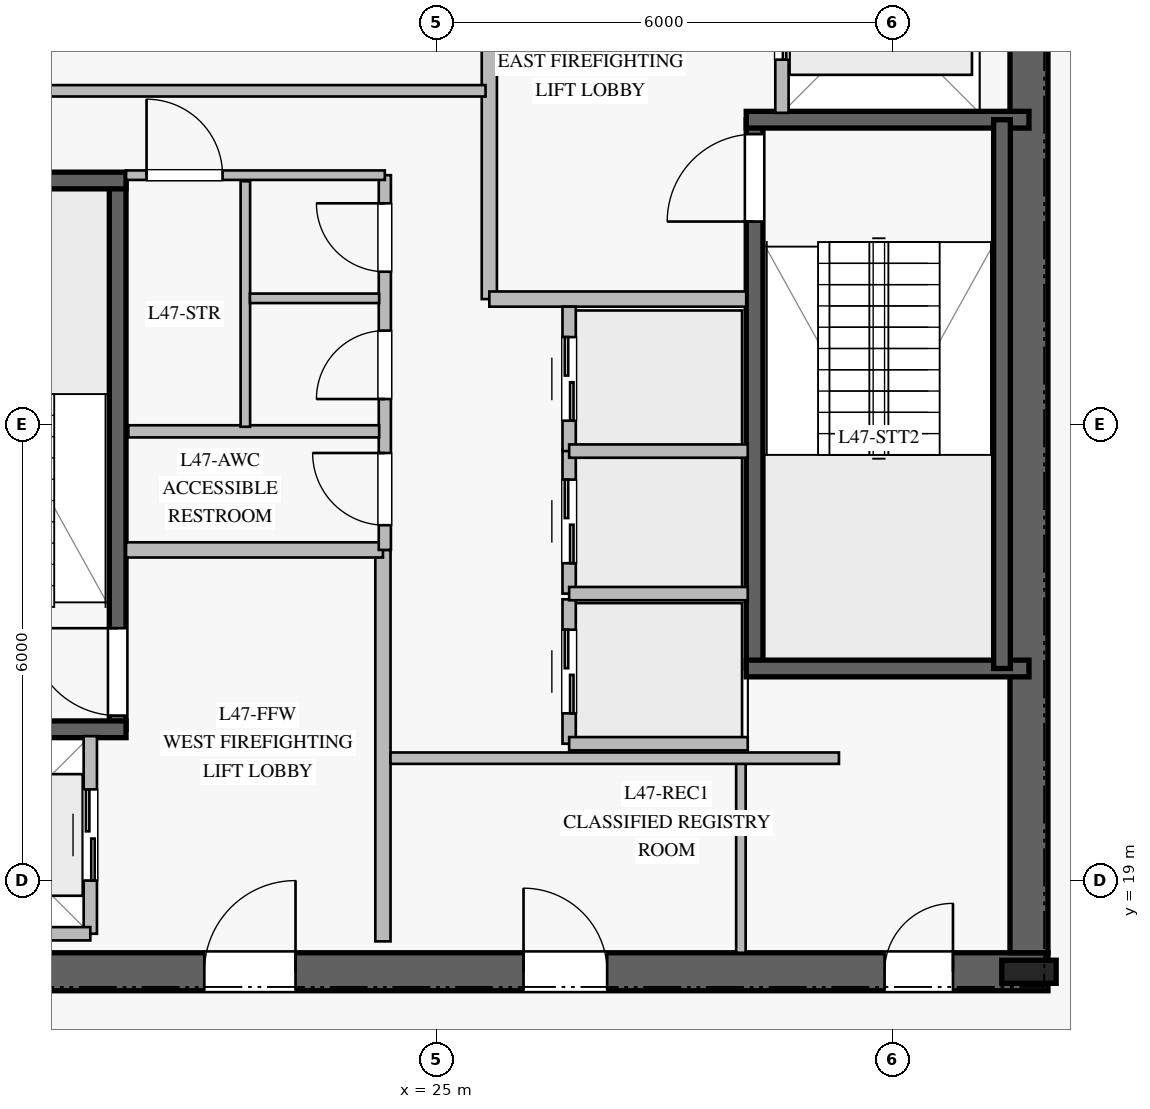
"""IFC4 building model, lengths in metres.
Left out: names, types, materials, properties, quantities, classifications, styles, units other than length and angle.
Written with IfcOpenShell. Run it as: python <this file> out.ifc"""

import sys

from ifc_helpers import new_model, si_unit, direction, frame, frame_2d, origin, origin_2d, place, context, subcontext, project, spatial, rectangle, i_section, extrude, element, fill, save


model = new_model("IFC4")
c1 = context("Model", 3, precision=1e-05, world=origin(), true_north=direction((0.0, 1.0)))
c2 = subcontext(c1, "Body", "Model", "MODEL_VIEW")
j1 = project(units=[si_unit("LENGTHUNIT", "METRE"), si_unit("PLANEANGLEUNIT", "RADIAN")], contexts=[c1])
p1 = place(None, origin())
s1 = spatial("IfcSite", under=j1, at=p1, CompositionType="ELEMENT")
p2 = place(p1, origin())
s2 = spatial("IfcBuilding", under=s1, at=p2, CompositionType="ELEMENT")
p3 = place(p2, frame((0.0, 0.0, 196.8)))
s3 = spatial("IfcBuildingStorey", under=s2, at=p3, CompositionType="ELEMENT", Elevation=196.8)
p4 = place(p3, frame((16.95, 17.8, 0.0), z_axis=(0.0, 0.0, 1.0), x_axis=(1.0, 0.0, 0.0)))
e1 = element("IfcWall", 1, at=p4, inside=s3, PredefinedType="SHEAR", context=c2, shape_type="SweptSolid", body=[
    extrude(rectangle(XDim=16.1, YDim=0.5, at=frame_2d((8.05, 0.0))), origin(), (0.0, 0.0, 1.0), 3.78),
])
p5 = place(p4, frame((5.0, 0.0, 0.0)))
e2 = element("IfcOpeningElement", 2, at=p5, cuts=e1, PredefinedType="OPENING", context=c2, shape_type="SweptSolid", body=[
    extrude(rectangle(XDim=1.2, YDim=2.25, at=frame_2d((0.6, 1.125))), frame((0.0, 0.26, 0.0), z_axis=(0.0, -1.0, 0.0), x_axis=(1.0, 0.0, 0.0)), (0.0, 0.0, 1.0), 0.52),
])
p6 = place(p4, frame((13.95, 0.0, 0.0)))
e3 = element("IfcOpeningElement", 3, at=p6, cuts=e1, PredefinedType="OPENING", context=c2, shape_type="SweptSolid", body=[
    extrude(rectangle(XDim=0.9, YDim=2.1, at=frame_2d((0.45, 1.05))), frame((0.0, 0.26, 0.0), z_axis=(0.0, -1.0, 0.0), x_axis=(1.0, 0.0, 0.0)), (0.0, 0.0, 1.0), 0.52),
])
p7 = place(p4, frame((9.2, 0.0, 0.0)))
e4 = element("IfcOpeningElement", 4, at=p7, cuts=e1, PredefinedType="OPENING", context=c2, shape_type="SweptSolid", body=[
    extrude(rectangle(XDim=1.1, YDim=2.2, at=frame_2d((0.55, 1.1))), frame((0.0, 0.26, 0.0), z_axis=(0.0, -1.0, 0.0), x_axis=(1.0, 0.0, 0.0)), (0.0, 0.0, 1.0), 0.52),
])
p8 = place(p3, frame((32.8, 18.05, 0.0), z_axis=(0.0, 0.0, 1.0), x_axis=(0.0, 1.0, 0.0)))
e5 = element("IfcWall", 5, at=p8, inside=s3, PredefinedType="SHEAR", context=c2, shape_type="SweptSolid", body=[
    extrude(rectangle(XDim=13.9, YDim=0.5, at=frame_2d((6.95, 0.0))), origin(), (0.0, 0.0, 1.0), 3.78),
])
p9 = place(p3, frame((32.8, 17.8, 0.0), z_axis=(0.0, 0.0, 1.0), x_axis=(1.0, 0.0, 0.0)))
e6 = element("IfcColumn", 6, at=p9, inside=s3, PredefinedType="COLUMN", context=c2, shape_type="SweptSolid", body=[
    extrude(i_section(OverallWidth=0.304, OverallDepth=0.716, WebThickness=0.021, FlangeThickness=0.04, at=origin_2d()), origin(), (0.0, 0.0, 1.0), 4.0),
])
p10 = place(p3, frame((20.81, 20.99, 0.0), z_axis=(0.0, 0.0, 1.0), x_axis=(0.0, 1.0, 0.0)))
e7 = element("IfcWall", 7, at=p10, inside=s3, PredefinedType="SOLIDWALL", context=c2, shape_type="SweptSolid", body=[
    extrude(rectangle(XDim=7.22, YDim=0.22, at=frame_2d((3.61, 0.0))), origin(), (0.0, 0.0, 1.0), 3.78),
])
p11 = place(p10, frame((0.18, 0.0, 0.0)))
e8 = element("IfcOpeningElement", 8, at=p11, cuts=e7, PredefinedType="OPENING", context=c2, shape_type="SweptSolid", body=[
    extrude(rectangle(XDim=1.15, YDim=2.2, at=frame_2d((0.575, 1.1))), frame((0.0, 0.12, 0.0), z_axis=(0.0, -1.0, 0.0), x_axis=(1.0, 0.0, 0.0)), (0.0, 0.0, 1.0), 0.24),
])
for number, where, z_axis, x_axis in (
    (9, (17.2, 20.99, 0.0), (0.0, 0.0, 1.0), (1.0, 0.0, 0.0)),
    (10, (17.2, 28.21, 0.0), (0.0, 0.0, 1.0), (1.0, 0.0, 0.0)),
):
    element("IfcWall", number, at=place(p3, frame(where, z_axis=z_axis, x_axis=x_axis)), inside=s3, PredefinedType="SOLIDWALL", context=c2, shape_type="SweptSolid", body=[
        extrude(rectangle(XDim=3.72, YDim=0.22, at=frame_2d((1.86, 0.0))), origin(), (0.0, 0.0, 1.0), 3.78),
    ])
p12 = place(p3, frame((29.19, 21.79, 0.0), z_axis=(0.0, 0.0, 1.0), x_axis=(0.0, 1.0, 0.0)))
e11 = element("IfcWall", 11, at=p12, inside=s3, PredefinedType="SOLIDWALL", context=c2, shape_type="SweptSolid", body=[
    extrude(rectangle(XDim=7.22, YDim=0.22, at=frame_2d((3.61, 0.0))), origin(), (0.0, 0.0, 1.0), 3.78),
])
p13 = place(p12, frame((5.88, 0.0, 0.0)))
e12 = element("IfcOpeningElement", 12, at=p13, cuts=e11, PredefinedType="OPENING", context=c2, shape_type="SweptSolid", body=[
    extrude(rectangle(XDim=1.15, YDim=2.2, at=frame_2d((0.575, 1.1))), frame((0.0, 0.12, 0.0), z_axis=(0.0, -1.0, 0.0), x_axis=(1.0, 0.0, 0.0)), (0.0, 0.0, 1.0), 0.24),
])
for number, where, z_axis, x_axis in (
    (13, (29.08, 21.79, 0.0), (0.0, 0.0, 1.0), (1.0, 0.0, 0.0)),
    (14, (29.08, 29.01, 0.0), (0.0, 0.0, 1.0), (1.0, 0.0, 0.0)),
):
    element("IfcWall", number, at=place(p3, frame(where, z_axis=z_axis, x_axis=x_axis)), inside=s3, PredefinedType="SOLIDWALL", context=c2, shape_type="SweptSolid", body=[
        extrude(rectangle(XDim=3.72, YDim=0.22, at=frame_2d((1.86, 0.0))), origin(), (0.0, 0.0, 1.0), 3.78),
    ])
p14 = place(p3, frame((32.445, 29.01, 0.0), z_axis=(0.0, 0.0, 1.0), x_axis=(0.0, -1.0, 0.0)))
e15 = element("IfcWall", 15, at=p14, inside=s3, PredefinedType="SOLIDWALL", context=c2, shape_type="SweptSolid", body=[
    extrude(rectangle(XDim=7.22, YDim=0.22, at=frame_2d((3.61, 0.0))), origin(), (0.0, 0.0, 1.0), 3.78),
])
p15 = place(p3, frame((24.3, 18.2, 0.0), z_axis=(0.0, 0.0, 1.0), x_axis=(0.0, 1.0, 0.0)))
e16 = element("IfcWall", 16, at=p15, inside=s3, PredefinedType="PARTITIONING", context=c2, shape_type="SweptSolid", body=[
    extrude(rectangle(XDim=5.15, YDim=0.2, at=frame_2d((2.575, 0.0))), origin(), (0.0, 0.0, 1.0), 3.78),
])
p16 = place(p3, frame((20.92, 23.35, 0.0), z_axis=(0.0, 0.0, 1.0), x_axis=(1.0, 0.0, 0.0)))
e17 = element("IfcWall", 17, at=p16, inside=s3, PredefinedType="PARTITIONING", context=c2, shape_type="SweptSolid", body=[
    extrude(rectangle(XDim=3.38, YDim=0.2, at=frame_2d((1.69, 0.0))), origin(), (0.0, 0.0, 1.0), 3.78),
])
p17 = place(p3, frame((25.7, 26.65, 0.0), z_axis=(0.0, 0.0, 1.0), x_axis=(0.0, 1.0, 0.0)))
e18 = element("IfcWall", 18, at=p17, inside=s3, PredefinedType="PARTITIONING", context=c2, shape_type="SweptSolid", body=[
    extrude(rectangle(XDim=5.15, YDim=0.2, at=frame_2d((2.575, 0.0))), origin(), (0.0, 0.0, 1.0), 3.78),
])
p18 = place(p3, frame((25.7, 26.65, 0.0), z_axis=(0.0, 0.0, 1.0), x_axis=(1.0, 0.0, 0.0)))
e19 = element("IfcWall", 19, at=p18, inside=s3, PredefinedType="PARTITIONING", context=c2, shape_type="SweptSolid", body=[
    extrude(rectangle(XDim=3.38, YDim=0.2, at=frame_2d((1.69, 0.0))), origin(), (0.0, 0.0, 1.0), 3.78),
])
p19 = place(p3, frame((24.325, 23.35, 0.0), z_axis=(0.0, 0.0, 1.0), x_axis=(0.0, 1.0, 0.0)))
e20 = element("IfcWall", 20, at=p19, inside=s3, PredefinedType="PLUMBINGWALL", context=c2, shape_type="SweptSolid", body=[
    extrude(rectangle(XDim=4.93, YDim=0.16, at=frame_2d((2.465, 0.0))), origin(), (0.0, 0.0, 1.0), 3.78),
])
p20 = place(p19, frame((0.325, 0.0, 0.0)))
e21 = element("IfcOpeningElement", 21, at=p20, cuts=e20, PredefinedType="OPENING", context=c2, shape_type="SweptSolid", body=[
    extrude(rectangle(XDim=0.95, YDim=2.1, at=frame_2d((0.475, 1.05))), frame((0.0, 0.09, 0.0), z_axis=(0.0, -1.0, 0.0), x_axis=(1.0, 0.0, 0.0)), (0.0, 0.0, 1.0), 0.18),
])
p21 = place(p19, frame((1.985, 0.0, 0.0)))
e22 = element("IfcOpeningElement", 22, at=p21, cuts=e20, PredefinedType="OPENING", context=c2, shape_type="SweptSolid", body=[
    extrude(rectangle(XDim=0.9, YDim=2.1, at=frame_2d((0.45, 1.05))), frame((0.0, 0.09, 0.0), z_axis=(0.0, -1.0, 0.0), x_axis=(1.0, 0.0, 0.0)), (0.0, 0.0, 1.0), 0.18),
])
p22 = place(p19, frame((3.66, 0.0, 0.0)))
e23 = element("IfcOpeningElement", 23, at=p22, cuts=e20, PredefinedType="OPENING", context=c2, shape_type="SweptSolid", body=[
    extrude(rectangle(XDim=0.9, YDim=2.1, at=frame_2d((0.45, 1.05))), frame((0.0, 0.09, 0.0), z_axis=(0.0, -1.0, 0.0), x_axis=(1.0, 0.0, 0.0)), (0.0, 0.0, 1.0), 0.18),
])
p23 = place(p3, frame((20.92, 28.28, 0.0), z_axis=(0.0, 0.0, 1.0), x_axis=(1.0, 0.0, 0.0)))
e24 = element("IfcWall", 24, at=p23, inside=s3, PredefinedType="PARTITIONING", context=c2, shape_type="SweptSolid", body=[
    extrude(rectangle(XDim=3.405, YDim=0.125, at=frame_2d((1.703, 0.0))), origin(), (0.0, 0.0, 1.0), 3.78),
])
p24 = place(p23, frame((0.27, 0.0, 0.0)))
e25 = element("IfcOpeningElement", 25, at=p24, cuts=e24, PredefinedType="OPENING", context=c2, shape_type="SweptSolid", body=[
    extrude(rectangle(XDim=1.0, YDim=2.15, at=frame_2d((0.5, 1.075))), frame((0.0, 0.073, 0.0), z_axis=(0.0, -1.0, 0.0), x_axis=(1.0, 0.0, 0.0)), (0.0, 0.0, 1.0), 0.145),
])
p25 = place(p3, frame((29.01, 18.05, 0.0), z_axis=(0.0, 0.0, 1.0), x_axis=(0.0, 1.0, 0.0)))
e26 = element("IfcWall", 26, at=p25, inside=s3, PredefinedType="PARTITIONING", context=c2, shape_type="SweptSolid", body=[
    extrude(rectangle(XDim=2.5, YDim=0.125, at=frame_2d((1.25, 0.0))), origin(), (0.0, 0.0, 1.0), 3.78),
])
p26 = place(p3, frame((20.95, 24.91, 0.0), z_axis=(0.0, 0.0, 1.0), x_axis=(1.0, 0.0, 0.0)))
e27 = element("IfcWall", 27, at=p26, inside=s3, PredefinedType="PLUMBINGWALL", context=c2, shape_type="SweptSolid", body=[
    extrude(rectangle(XDim=3.3, YDim=0.16, at=frame_2d((1.65, 0.0))), origin(), (0.0, 0.0, 1.0), 3.78),
])
p27 = place(p3, frame((22.49, 24.97, 0.0), z_axis=(0.0, 0.0, 1.0), x_axis=(0.0, 1.0, 0.0)))
e28 = element("IfcWall", 28, at=p27, inside=s3, PredefinedType="PARTITIONING", context=c2, shape_type="SweptSolid", body=[
    extrude(rectangle(XDim=3.23, YDim=0.125, at=frame_2d((1.615, 0.0))), origin(), (0.0, 0.0, 1.0), 3.78),
])
p28 = place(p3, frame((22.55, 26.66, 0.0), z_axis=(0.0, 0.0, 1.0), x_axis=(1.0, 0.0, 0.0)))
e29 = element("IfcWall", 29, at=p28, inside=s3, PredefinedType="PARTITIONING", context=c2, shape_type="SweptSolid", body=[
    extrude(rectangle(XDim=1.7, YDim=0.125, at=frame_2d((0.85, 0.0))), origin(), (0.0, 0.0, 1.0), 3.78),
])
p29 = place(p3, frame((24.4, 20.61, 0.0), z_axis=(0.0, 0.0, 1.0), x_axis=(1.0, 0.0, 0.0)))
e30 = element("IfcWall", 30, at=p29, inside=s3, PredefinedType="PARTITIONING", context=c2, shape_type="SweptSolid", body=[
    extrude(rectangle(XDim=5.9, YDim=0.15, at=frame_2d((2.95, 0.0))), origin(), (0.0, 0.0, 1.0), 3.78),
])
p30 = place(p3, frame((19.75, 29.39, 0.0), z_axis=(0.0, 0.0, 1.0), x_axis=(1.0, 0.0, 0.0)))
e31 = element("IfcWall", 31, at=p30, inside=s3, PredefinedType="PARTITIONING", context=c2, shape_type="SweptSolid", body=[
    extrude(rectangle(XDim=5.9, YDim=0.15, at=frame_2d((2.95, 0.0))), origin(), (0.0, 0.0, 1.0), 3.78),
])
p31 = place(p3, frame((26.75, 20.8, 0.0), z_axis=(0.0, 0.0, 1.0), x_axis=(0.0, 1.0, 0.0)))
e32 = element("IfcWall", 32, at=p31, inside=s3, PredefinedType="PARTITIONING", context=c2, shape_type="SweptSolid", body=[
    extrude(rectangle(XDim=1.9, YDim=0.175, at=frame_2d((0.95, 0.0))), origin(), (0.0, 0.0, 1.0), 3.78),
])
p32 = place(p31, frame((0.4, 0.0, 0.0)))
e33 = element("IfcOpeningElement", 33, at=p32, cuts=e32, PredefinedType="OPENING", context=c2, shape_type="SweptSolid", body=[
    extrude(rectangle(XDim=1.1, YDim=2.2, at=frame_2d((0.55, 1.1))), frame((0.0, 0.098, 0.0), z_axis=(0.0, -1.0, 0.0), x_axis=(1.0, 0.0, 0.0)), (0.0, 0.0, 1.0), 0.195),
])
p33 = place(p3, frame((26.75, 20.8, 0.0), z_axis=(0.0, 0.0, 1.0), x_axis=(1.0, 0.0, 0.0)))
e34 = element("IfcWall", 34, at=p33, inside=s3, PredefinedType="PARTITIONING", context=c2, shape_type="SweptSolid", body=[
    extrude(rectangle(XDim=2.35, YDim=0.175, at=frame_2d((1.175, 0.0))), origin(), (0.0, 0.0, 1.0), 3.78),
])
p34 = place(p3, frame((26.75, 22.775, 0.0), z_axis=(0.0, 0.0, 1.0), x_axis=(0.0, 1.0, 0.0)))
e35 = element("IfcWall", 35, at=p34, inside=s3, PredefinedType="PARTITIONING", context=c2, shape_type="SweptSolid", body=[
    extrude(rectangle(XDim=1.9, YDim=0.175, at=frame_2d((0.95, 0.0))), origin(), (0.0, 0.0, 1.0), 3.78),
])
p35 = place(p34, frame((0.4, 0.0, 0.0)))
e36 = element("IfcOpeningElement", 36, at=p35, cuts=e35, PredefinedType="OPENING", context=c2, shape_type="SweptSolid", body=[
    extrude(rectangle(XDim=1.1, YDim=2.2, at=frame_2d((0.55, 1.1))), frame((0.0, 0.098, 0.0), z_axis=(0.0, -1.0, 0.0), x_axis=(1.0, 0.0, 0.0)), (0.0, 0.0, 1.0), 0.195),
])
p36 = place(p3, frame((26.75, 22.775, 0.0), z_axis=(0.0, 0.0, 1.0), x_axis=(1.0, 0.0, 0.0)))
e37 = element("IfcWall", 37, at=p36, inside=s3, PredefinedType="PARTITIONING", context=c2, shape_type="SweptSolid", body=[
    extrude(rectangle(XDim=2.35, YDim=0.175, at=frame_2d((1.175, 0.0))), origin(), (0.0, 0.0, 1.0), 3.78),
])
p37 = place(p3, frame((26.75, 24.65, 0.0), z_axis=(0.0, 0.0, 1.0), x_axis=(0.0, 1.0, 0.0)))
e38 = element("IfcWall", 38, at=p37, inside=s3, PredefinedType="PARTITIONING", context=c2, shape_type="SweptSolid", body=[
    extrude(rectangle(XDim=1.9, YDim=0.175, at=frame_2d((0.95, 0.0))), origin(), (0.0, 0.0, 1.0), 3.78),
])
p38 = place(p37, frame((0.4, 0.0, 0.0)))
e39 = element("IfcOpeningElement", 39, at=p38, cuts=e38, PredefinedType="OPENING", context=c2, shape_type="SweptSolid", body=[
    extrude(rectangle(XDim=1.1, YDim=2.2, at=frame_2d((0.55, 1.1))), frame((0.0, 0.098, 0.0), z_axis=(0.0, -1.0, 0.0), x_axis=(1.0, 0.0, 0.0)), (0.0, 0.0, 1.0), 0.195),
])
p39 = place(p3, frame((26.75, 24.65, 0.0), z_axis=(0.0, 0.0, 1.0), x_axis=(1.0, 0.0, 0.0)))
e40 = element("IfcWall", 40, at=p39, inside=s3, PredefinedType="PARTITIONING", context=c2, shape_type="SweptSolid", body=[
    extrude(rectangle(XDim=2.35, YDim=0.175, at=frame_2d((1.175, 0.0))), origin(), (0.0, 0.0, 1.0), 3.78),
])
p40 = place(p3, frame((20.45, 18.3, 0.0), z_axis=(0.0, 0.0, 1.0), x_axis=(0.0, 1.0, 0.0)))
e41 = element("IfcWall", 41, at=p40, inside=s3, PredefinedType="PARTITIONING", context=c2, shape_type="SweptSolid", body=[
    extrude(rectangle(XDim=2.6, YDim=0.175, at=frame_2d((1.3, 0.0))), origin(), (0.0, 0.0, 1.0), 3.78),
])
p41 = place(p40, frame((0.7, 0.0, 0.0)))
e42 = element("IfcOpeningElement", 42, at=p41, cuts=e41, PredefinedType="OPENING", context=c2, shape_type="SweptSolid", body=[
    extrude(rectangle(XDim=1.2, YDim=2.2, at=frame_2d((0.6, 1.1))), frame((0.0, 0.098, 0.0), z_axis=(0.0, -1.0, 0.0), x_axis=(1.0, 0.0, 0.0)), (0.0, 0.0, 1.0), 0.195),
])
p42 = place(p3, frame((17.85, 18.3, 0.0), z_axis=(0.0, 0.0, 1.0), x_axis=(1.0, 0.0, 0.0)))
e43 = element("IfcWall", 43, at=p42, inside=s3, PredefinedType="PARTITIONING", context=c2, shape_type="SweptSolid", body=[
    extrude(rectangle(XDim=2.6, YDim=0.175, at=frame_2d((1.3, 0.0))), origin(), (0.0, 0.0, 1.0), 3.78),
])
p43 = place(p3, frame((29.55, 29.1, 0.0), z_axis=(0.0, 0.0, 1.0), x_axis=(0.0, 1.0, 0.0)))
e44 = element("IfcWall", 44, at=p43, inside=s3, PredefinedType="PARTITIONING", context=c2, shape_type="SweptSolid", body=[
    extrude(rectangle(XDim=2.6, YDim=0.175, at=frame_2d((1.3, 0.0))), origin(), (0.0, 0.0, 1.0), 3.78),
])
p44 = place(p43, frame((0.7, 0.0, 0.0)))
e45 = element("IfcOpeningElement", 45, at=p44, cuts=e44, PredefinedType="OPENING", context=c2, shape_type="SweptSolid", body=[
    extrude(rectangle(XDim=1.2, YDim=2.2, at=frame_2d((0.6, 1.1))), frame((0.0, 0.098, 0.0), z_axis=(0.0, -1.0, 0.0), x_axis=(1.0, 0.0, 0.0)), (0.0, 0.0, 1.0), 0.195),
])
p45 = place(p11, origin())
e46 = element("IfcDoor", 46, at=p45, inside=s3, OperationType="SINGLE_SWING_RIGHT", PredefinedType="DOOR", context=c2, shape_type="SweptSolid", body=[
    extrude(rectangle(XDim=1.15, YDim=2.2, at=frame_2d((0.575, 1.1))), frame((0.0, 0.025, 0.0), z_axis=(0.0, -1.0, 0.0), x_axis=(1.0, 0.0, 0.0)), (0.0, 0.0, 1.0), 0.05),
])
fill(e8, e46)
p46 = place(p13, origin())
e47 = element("IfcDoor", 47, at=p46, inside=s3, OperationType="SINGLE_SWING_LEFT", PredefinedType="DOOR", context=c2, shape_type="SweptSolid", body=[
    extrude(rectangle(XDim=1.15, YDim=2.2, at=frame_2d((0.575, 1.1))), frame((0.0, 0.025, 0.0), z_axis=(0.0, -1.0, 0.0), x_axis=(1.0, 0.0, 0.0)), (0.0, 0.0, 1.0), 0.05),
])
fill(e12, e47)
p47 = place(p5, origin())
e48 = element("IfcDoor", 48, at=p47, inside=s3, OperationType="SINGLE_SWING_RIGHT", PredefinedType="DOOR", context=c2, shape_type="SweptSolid", body=[
    extrude(rectangle(XDim=1.2, YDim=2.25, at=frame_2d((0.6, 1.125))), frame((0.0, 0.025, 0.0), z_axis=(0.0, -1.0, 0.0), x_axis=(1.0, 0.0, 0.0)), (0.0, 0.0, 1.0), 0.05),
])
fill(e2, e48)
p48 = place(p20, origin())
e49 = element("IfcDoor", 49, at=p48, inside=s3, OperationType="SINGLE_SWING_RIGHT", PredefinedType="DOOR", context=c2, shape_type="SweptSolid", body=[
    extrude(rectangle(XDim=0.95, YDim=2.1, at=frame_2d((0.475, 1.05))), frame((0.0, 0.025, 0.0), z_axis=(0.0, -1.0, 0.0), x_axis=(1.0, 0.0, 0.0)), (0.0, 0.0, 1.0), 0.05),
])
fill(e21, e49)
p49 = place(p21, origin())
e50 = element("IfcDoor", 50, at=p49, inside=s3, OperationType="SINGLE_SWING_LEFT", PredefinedType="DOOR", context=c2, shape_type="SweptSolid", body=[
    extrude(rectangle(XDim=0.9, YDim=2.1, at=frame_2d((0.45, 1.05))), frame((0.0, 0.025, 0.0), z_axis=(0.0, -1.0, 0.0), x_axis=(1.0, 0.0, 0.0)), (0.0, 0.0, 1.0), 0.05),
])
fill(e22, e50)
p50 = place(p22, origin())
e51 = element("IfcDoor", 51, at=p50, inside=s3, OperationType="SINGLE_SWING_RIGHT", PredefinedType="DOOR", context=c2, shape_type="SweptSolid", body=[
    extrude(rectangle(XDim=0.9, YDim=2.1, at=frame_2d((0.45, 1.05))), frame((0.0, 0.025, 0.0), z_axis=(0.0, -1.0, 0.0), x_axis=(1.0, 0.0, 0.0)), (0.0, 0.0, 1.0), 0.05),
])
fill(e23, e51)
p51 = place(p24, origin())
e52 = element("IfcDoor", 52, at=p51, inside=s3, OperationType="SINGLE_SWING_LEFT", PredefinedType="DOOR", context=c2, shape_type="SweptSolid", body=[
    extrude(rectangle(XDim=1.0, YDim=2.15, at=frame_2d((0.5, 1.075))), frame((0.0, 0.025, 0.0), z_axis=(0.0, -1.0, 0.0), x_axis=(1.0, 0.0, 0.0)), (0.0, 0.0, 1.0), 0.05),
])
fill(e25, e52)
p52 = place(p6, origin())
e53 = element("IfcDoor", 53, at=p52, inside=s3, OperationType="SINGLE_SWING_RIGHT", PredefinedType="DOOR", context=c2, shape_type="SweptSolid", body=[
    extrude(rectangle(XDim=0.9, YDim=2.1, at=frame_2d((0.45, 1.05))), frame((0.0, 0.025, 0.0), z_axis=(0.0, -1.0, 0.0), x_axis=(1.0, 0.0, 0.0)), (0.0, 0.0, 1.0), 0.05),
])
fill(e3, e53)
p53 = place(p7, origin())
e54 = element("IfcDoor", 54, at=p53, inside=s3, OperationType="SINGLE_SWING_LEFT", PredefinedType="DOOR", context=c2, shape_type="SweptSolid", body=[
    extrude(rectangle(XDim=1.1, YDim=2.2, at=frame_2d((0.55, 1.1))), frame((0.0, 0.025, 0.0), z_axis=(0.0, -1.0, 0.0), x_axis=(1.0, 0.0, 0.0)), (0.0, 0.0, 1.0), 0.05),
])
fill(e4, e54)
p54 = place(p32, origin())
e55 = element("IfcDoor", 55, at=p54, inside=s3, OperationType="DOUBLE_DOOR_SLIDING", PredefinedType="DOOR", context=c2, shape_type="SweptSolid", body=[
    extrude(rectangle(XDim=1.1, YDim=2.2, at=frame_2d((0.55, 1.1))), frame((0.0, 0.025, 0.0), z_axis=(0.0, -1.0, 0.0), x_axis=(1.0, 0.0, 0.0)), (0.0, 0.0, 1.0), 0.05),
])
fill(e33, e55)
p55 = place(p35, origin())
e56 = element("IfcDoor", 56, at=p55, inside=s3, OperationType="DOUBLE_DOOR_SLIDING", PredefinedType="DOOR", context=c2, shape_type="SweptSolid", body=[
    extrude(rectangle(XDim=1.1, YDim=2.2, at=frame_2d((0.55, 1.1))), frame((0.0, 0.025, 0.0), z_axis=(0.0, -1.0, 0.0), x_axis=(1.0, 0.0, 0.0)), (0.0, 0.0, 1.0), 0.05),
])
fill(e36, e56)
p56 = place(p38, origin())
e57 = element("IfcDoor", 57, at=p56, inside=s3, OperationType="DOUBLE_DOOR_SLIDING", PredefinedType="DOOR", context=c2, shape_type="SweptSolid", body=[
    extrude(rectangle(XDim=1.1, YDim=2.2, at=frame_2d((0.55, 1.1))), frame((0.0, 0.025, 0.0), z_axis=(0.0, -1.0, 0.0), x_axis=(1.0, 0.0, 0.0)), (0.0, 0.0, 1.0), 0.05),
])
fill(e39, e57)
p57 = place(p41, origin())
e58 = element("IfcDoor", 58, at=p57, inside=s3, OperationType="DOUBLE_DOOR_SLIDING", PredefinedType="DOOR", context=c2, shape_type="SweptSolid", body=[
    extrude(rectangle(XDim=1.2, YDim=2.2, at=frame_2d((0.6, 1.1))), frame((0.0, 0.025, 0.0), z_axis=(0.0, -1.0, 0.0), x_axis=(1.0, 0.0, 0.0)), (0.0, 0.0, 1.0), 0.05),
])
fill(e42, e58)
p58 = place(p44, origin())
e59 = element("IfcDoor", 59, at=p58, inside=s3, OperationType="DOUBLE_DOOR_SLIDING", PredefinedType="DOOR", context=c2, shape_type="SweptSolid", body=[
    extrude(rectangle(XDim=1.2, YDim=2.2, at=frame_2d((0.6, 1.1))), frame((0.0, 0.025, 0.0), z_axis=(0.0, -1.0, 0.0), x_axis=(1.0, 0.0, 0.0)), (0.0, 0.0, 1.0), 0.05),
])
fill(e45, e59)
save(model, sys.argv[1])
